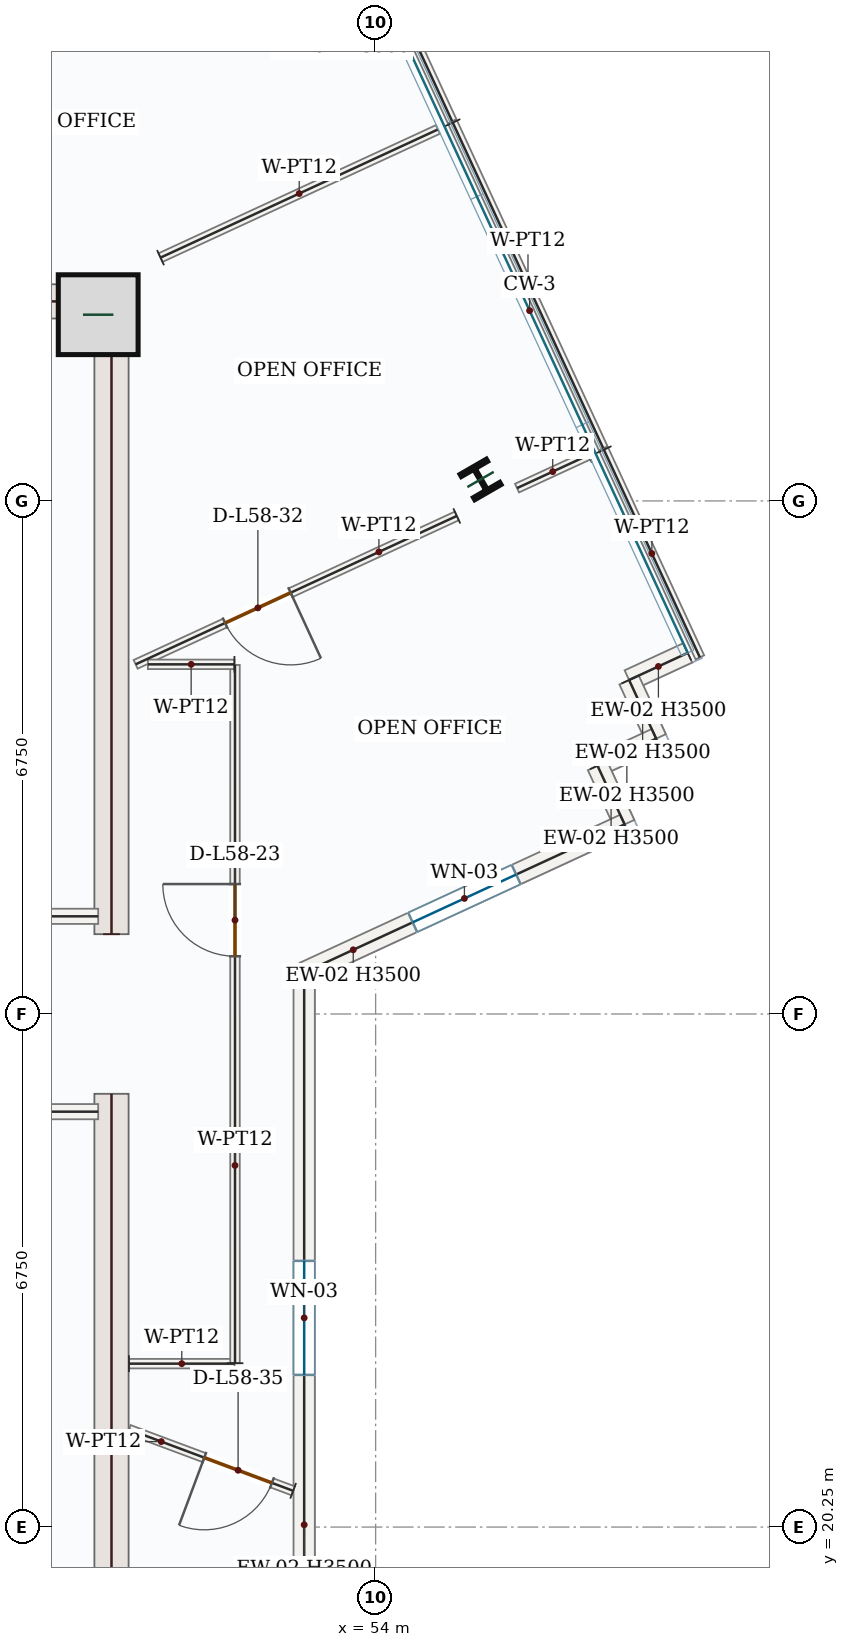
"""IFC4 building model, lengths in metres.
Left out: names, types, materials, properties, quantities, classifications, styles, units other than length and angle.
Written with IfcOpenShell. Run it as: python <this file> out.ifc"""

import sys

from ifc_helpers import new_model, si_unit, direction, frame, frame_2d, origin, origin_2d, place, context, subcontext, project, spatial, rectangle, i_section, extrude, source, transform, mapped, element, fill, save


model = new_model("IFC4")
c1 = context("Model", 3, precision=1e-05, world=origin(), true_north=direction((0.0, 1.0)))
c2 = subcontext(c1, "Body", "Model", "MODEL_VIEW")
j1 = project(units=[si_unit("LENGTHUNIT", "METRE"), si_unit("PLANEANGLEUNIT", "RADIAN")], contexts=[c1])
p1 = place(None, origin())
s1 = spatial("IfcSite", under=j1, at=p1, CompositionType="ELEMENT")
p2 = place(p1, origin())
s2 = spatial("IfcBuilding", under=s1, at=p2, CompositionType="ELEMENT")
p3 = place(p2, frame((0.0, 0.0, 246.6)))
s3 = spatial("IfcBuildingStorey", under=s2, at=p3, CompositionType="ELEMENT", Elevation=246.6)
m1 = source(origin(), c2, "Body", "SweptSolid", [
    extrude(rectangle(XDim=8.55, YDim=0.45, at=frame_2d((4.275, 0.0))), origin(), (0.0, 0.0, 1.0), 3.5),
])
for number, where, z_axis, x_axis in (
    (1, (50.525, 17.4, 0.0), (0.0, 0.0, 1.0), (0.0, 1.0, 0.0)),
    (2, (50.525, 28.05, 0.0), (0.0, 0.0, 1.0), (0.0, 1.0, 0.0)),
):
    element("IfcWall", number, at=place(p3, frame(where, z_axis=z_axis, x_axis=x_axis)), inside=s3, PredefinedType="SHEAR", context=c2, shape_type="MappedRepresentation", body=[
        mapped(m1, transform((0.0, 0.0, 0.0), x_axis=(1.0, 0.0, 0.0), y_axis=(0.0, 1.0, 0.0), z_axis=(0.0, 0.0, 1.0), scale=1.0)),
    ])
m2 = source(origin(), c2, "Body", "SweptSolid", [
    extrude(rectangle(XDim=7.1, YDim=0.45, at=frame_2d((3.55, 0.0))), origin(), (0.0, 0.0, 1.0), 3.5),
])
p4 = place(p3, frame((43.2, 36.375, 0.0), z_axis=(0.0, 0.0, 1.0), x_axis=(1.0, 0.0, 0.0)))
e3 = element("IfcWall", 3, at=p4, inside=s3, PredefinedType="SHEAR", context=c2, shape_type="MappedRepresentation", body=[
    mapped(m2, transform((0.0, 0.0, 0.0), x_axis=(1.0, 0.0, 0.0), y_axis=(0.0, 1.0, 0.0), z_axis=(0.0, 0.0, 1.0), scale=1.0)),
])
m3 = source(origin(), c2, "Body", "SweptSolid", [
    extrude(rectangle(XDim=1.05, YDim=1.05, at=origin_2d()), origin(), (0.0, 0.0, 1.0), 3.75),
])
p5 = place(p3, frame((50.35, 36.2, 0.0), z_axis=(0.0, 0.0, 1.0), x_axis=(1.0, 0.0, 0.0)))
e4 = element("IfcColumn", 4, at=p5, inside=s3, PredefinedType="COLUMN", context=c2, shape_type="MappedRepresentation", body=[
    mapped(m3, transform((0.0, 0.0, 0.0), x_axis=(1.0, 0.0, 0.0), y_axis=(0.0, 1.0, 0.0), z_axis=(0.0, 0.0, 1.0), scale=1.0)),
])
m4 = source(origin(), c2, "Body", "SweptSolid", [
    extrude(i_section(OverallWidth=0.399, OverallDepth=0.386, WebThickness=0.021, FlangeThickness=0.033, FilletRadius=0.018, at=origin_2d()), origin(), (0.0, 0.0, 1.0), 3.75),
])
p6 = place(p3, frame((55.38, 34.032, 0.0), z_axis=(0.0, 0.0, 1.0), x_axis=(0.866025403784, 0.5, 0.0)))
e5 = element("IfcColumn", 5, at=p6, inside=s3, PredefinedType="COLUMN", context=c2, shape_type="MappedRepresentation", body=[
    mapped(m4, transform((0.0, 0.0, 0.0), x_axis=(1.0, 0.0, 0.0), y_axis=(0.0, 1.0, 0.0), z_axis=(0.0, 0.0, 1.0), scale=1.0)),
])
p7 = place(p3, frame((46.655, 39.26, 0.0), z_axis=(0.0, 0.0, 1.0), x_axis=(0.907767275269, 0.419474163627, 0.0)))
e6 = element("IfcWall", 6, at=p7, inside=s3, PredefinedType="SOLIDWALL", context=c2, shape_type="SweptSolid", body=[
    extrude(rectangle(XDim=5.545, YDim=0.28, at=frame_2d((2.772, 0.0))), origin(), (0.0, 0.0, 1.0), 3.5),
])
p8 = place(p7, frame((2.022, 0.0, 0.85)))
e7 = element("IfcOpeningElement", 7, at=p8, cuts=e6, PredefinedType="OPENING", context=c2, shape_type="SweptSolid", body=[
    extrude(rectangle(XDim=1.5, YDim=1.5, at=frame_2d((0.75, 0.75))), frame((0.0, 0.15, 0.0), z_axis=(0.0, -1.0, 0.0), x_axis=(1.0, 0.0, 0.0)), (0.0, 0.0, 1.0), 0.3),
])
m5 = source(origin(), c2, "Body", "SweptSolid", [
    extrude(rectangle(XDim=0.85, YDim=0.28, at=frame_2d((0.425, 0.0))), origin(), (0.0, 0.0, 1.0), 3.5),
])
for number, where, z_axis, x_axis in (
    (8, (58.106, 31.75, 0.0), (0.0, 0.0, 1.0), (-0.908, -0.419, 0.0)),
    (9, (57.334, 31.394, 0.0), (0.0, 0.0, 1.0), (0.419, -0.908, 0.0)),
):
    element("IfcWall", number, at=place(p3, frame(where, z_axis=z_axis, x_axis=x_axis)), inside=s3, PredefinedType="SOLIDWALL", context=c2, shape_type="MappedRepresentation", body=[
        mapped(m5, transform((0.0, 0.0, 0.0), x_axis=(1.0, 0.0, 0.0), y_axis=(0.0, 1.0, 0.0), z_axis=(0.0, 0.0, 1.0), scale=1.0)),
    ])
m6 = source(origin(), c2, "Body", "SweptSolid", [
    extrude(rectangle(XDim=0.85, YDim=0.28, at=frame_2d((0.425, 0.0))), origin(), (0.0, 0.0, 1.0), 3.5),
])
for number, where, z_axis, x_axis in (
    (10, (57.691, 30.622, 0.0), (0.0, 0.0, 1.0), (-0.908, -0.419, 0.0)),
    (11, (56.919, 30.266, 0.0), (0.0, 0.0, 1.0), (0.419, -0.908, 0.0)),
):
    element("IfcWall", number, at=place(p3, frame(where, z_axis=z_axis, x_axis=x_axis)), inside=s3, PredefinedType="SOLIDWALL", context=c2, shape_type="MappedRepresentation", body=[
        mapped(m6, transform((0.0, 0.0, 0.0), x_axis=(1.0, 0.0, 0.0), y_axis=(0.0, 1.0, 0.0), z_axis=(0.0, 0.0, 1.0), scale=1.0)),
    ])
p9 = place(p3, frame((57.276, 29.494, 0.0), z_axis=(0.0, 0.0, 1.0), x_axis=(-0.907756183213, -0.419498166669, 0.0)))
e12 = element("IfcWall", 12, at=p9, inside=s3, PredefinedType="SOLIDWALL", context=c2, shape_type="SweptSolid", body=[
    extrude(rectangle(XDim=4.644, YDim=0.28, at=frame_2d((2.322, 0.0))), origin(), (0.0, 0.0, 1.0), 3.5),
])
p10 = place(p9, frame((1.572, 0.0, 0.85)))
e13 = element("IfcOpeningElement", 13, at=p10, cuts=e12, PredefinedType="OPENING", context=c2, shape_type="SweptSolid", body=[
    extrude(rectangle(XDim=1.5, YDim=1.5, at=frame_2d((0.75, 0.75))), frame((0.0, 0.15, 0.0), z_axis=(0.0, -1.0, 0.0), x_axis=(1.0, 0.0, 0.0)), (0.0, 0.0, 1.0), 0.3),
])
p11 = place(p3, frame((53.06, 27.546, 0.0), z_axis=(0.0, 0.0, 1.0), x_axis=(0.0, -1.0, 0.0)))
e14 = element("IfcWall", 14, at=p11, inside=s3, PredefinedType="SOLIDWALL", context=c2, shape_type="SweptSolid", body=[
    extrude(rectangle(XDim=9.088, YDim=0.28, at=frame_2d((4.544, 0.0))), origin(), (0.0, 0.0, 1.0), 3.5),
])
p12 = place(p11, frame((3.794, 0.0, 0.85)))
e15 = element("IfcOpeningElement", 15, at=p12, cuts=e14, PredefinedType="OPENING", context=c2, shape_type="SweptSolid", body=[
    extrude(rectangle(XDim=1.5, YDim=1.5, at=frame_2d((0.75, 0.75))), frame((0.0, 0.15, 0.0), z_axis=(0.0, -1.0, 0.0), x_axis=(1.0, 0.0, 0.0)), (0.0, 0.0, 1.0), 0.3),
])
m7 = source(origin(), c2, "Body", "SweptSolid", [
    extrude(rectangle(XDim=4.25, YDim=0.2, at=frame_2d((2.125, 0.0))), origin(), (0.0, 0.0, 1.0), 3.5),
])
for number, where, z_axis, x_axis in (
    (16, (46.1, 25.715, 0.0), (0.0, 0.0, 1.0), (1.0, 0.0, 0.0)),
    (17, (46.1, 28.285, 0.0), (0.0, 0.0, 1.0), (1.0, 0.0, 0.0)),
):
    element("IfcWall", number, at=place(p3, frame(where, z_axis=z_axis, x_axis=x_axis)), inside=s3, PredefinedType="SOLIDWALL", context=c2, shape_type="MappedRepresentation", body=[
        mapped(m7, transform((0.0, 0.0, 0.0), x_axis=(1.0, 0.0, 0.0), y_axis=(0.0, 1.0, 0.0), z_axis=(0.0, 0.0, 1.0), scale=1.0)),
    ])
m8 = source(origin(), c2, "Body", "SweptSolid", [
    extrude(rectangle(XDim=4.02, YDim=0.125, at=frame_2d((2.01, 0.0))), origin(), (0.0, 0.0, 1.0), 3.5),
])
p13 = place(p3, frame((51.17, 36.951, 0.0), z_axis=(0.0, 0.0, 1.0), x_axis=(0.907776222313, 0.419454801145, 0.0)))
e18 = element("IfcWall", 18, at=p13, inside=s3, PredefinedType="PARTITIONING", context=c2, shape_type="MappedRepresentation", body=[
    mapped(m8, transform((0.0, 0.0, 0.0), x_axis=(1.0, 0.0, 0.0), y_axis=(0.0, 1.0, 0.0), z_axis=(0.0, 0.0, 1.0), scale=1.0)),
])
m9 = source(origin(), c2, "Body", "SweptSolid", [
    extrude(rectangle(XDim=4.72, YDim=0.125, at=frame_2d((2.36, 0.0))), origin(), (0.0, 0.0, 1.0), 3.5),
])
p14 = place(p3, frame((55.015, 38.727, 0.0), z_axis=(0.0, 0.0, 1.0), x_axis=(0.419422223592, -0.907791274665, 0.0)))
e19 = element("IfcWall", 19, at=p14, inside=s3, PredefinedType="PARTITIONING", context=c2, shape_type="MappedRepresentation", body=[
    mapped(m9, transform((0.0, 0.0, 0.0), x_axis=(1.0, 0.0, 0.0), y_axis=(0.0, 1.0, 0.0), z_axis=(0.0, 0.0, 1.0), scale=1.0)),
])
m10 = source(origin(), c2, "Body", "SweptSolid", [
    extrude(rectangle(XDim=1.034, YDim=0.125, at=frame_2d((0.517, 0.0))), origin(), (0.0, 0.0, 1.0), 3.5),
])
p15 = place(p3, frame((56.799, 34.352, 0.0), z_axis=(0.0, 0.0, 1.0), x_axis=(-0.907786599617, -0.419432342049, 0.0)))
e20 = element("IfcWall", 20, at=p15, inside=s3, PredefinedType="PARTITIONING", context=c2, shape_type="MappedRepresentation", body=[
    mapped(m10, transform((0.0, 0.0, 0.0), x_axis=(1.0, 0.0, 0.0), y_axis=(0.0, 1.0, 0.0), z_axis=(0.0, 0.0, 1.0), scale=1.0)),
])
p16 = place(p3, frame((55.068, 33.552, 0.0), z_axis=(0.0, 0.0, 1.0), x_axis=(-0.90779658515, -0.419410729465, 0.0)))
e21 = element("IfcWall", 21, at=p16, inside=s3, PredefinedType="PARTITIONING", context=c2, shape_type="SweptSolid", body=[
    extrude(rectangle(XDim=4.655, YDim=0.125, at=frame_2d((2.327, 0.0))), origin(), (0.0, 0.0, 1.0), 3.5),
])
p17 = place(p16, frame((2.408, 0.0, 0.0)))
e22 = element("IfcOpeningElement", 22, at=p17, cuts=e21, PredefinedType="OPENING", context=c2, shape_type="SweptSolid", body=[
    extrude(rectangle(XDim=0.95, YDim=2.15, at=frame_2d((0.475, 1.075))), frame((0.0, 0.073, 0.0), z_axis=(0.0, -1.0, 0.0), x_axis=(1.0, 0.0, 0.0)), (0.0, 0.0, 1.0), 0.145),
])
m11 = source(origin(), c2, "Body", "SweptSolid", [
    extrude(rectangle(XDim=1.389, YDim=0.125, at=frame_2d((0.695, 0.0))), origin(), (0.0, 0.0, 1.0), 3.5),
])
p18 = place(p3, frame((50.755, 22.4, 0.0), z_axis=(0.0, 0.0, 1.0), x_axis=(1.0, 0.0, 0.0)))
e23 = element("IfcWall", 23, at=p18, inside=s3, PredefinedType="PARTITIONING", context=c2, shape_type="MappedRepresentation", body=[
    mapped(m11, transform((0.0, 0.0, 0.0), x_axis=(1.0, 0.0, 0.0), y_axis=(0.0, 1.0, 0.0), z_axis=(0.0, 0.0, 1.0), scale=1.0)),
])
p19 = place(p3, frame((52.15, 22.406, 0.0), z_axis=(0.0, 0.0, 1.0), x_axis=(-2.657666e-05, 0.999999999647, 0.0)))
e24 = element("IfcWall", 24, at=p19, inside=s3, PredefinedType="PARTITIONING", context=c2, shape_type="SweptSolid", body=[
    extrude(rectangle(XDim=9.186, YDim=0.125, at=frame_2d((4.593, 0.0))), origin(), (0.0, 0.0, 1.0), 3.5),
])
p20 = place(p19, frame((5.354, 0.0, 0.0)))
e25 = element("IfcOpeningElement", 25, at=p20, cuts=e24, PredefinedType="OPENING", context=c2, shape_type="SweptSolid", body=[
    extrude(rectangle(XDim=0.95, YDim=2.15, at=frame_2d((0.475, 1.075))), frame((0.0, 0.073, 0.0), z_axis=(0.0, -1.0, 0.0), x_axis=(1.0, 0.0, 0.0)), (0.0, 0.0, 1.0), 0.145),
])
m12 = source(origin(), c2, "Body", "SweptSolid", [
    extrude(rectangle(XDim=1.139, YDim=0.125, at=frame_2d((0.569, 0.0))), origin(), (0.0, 0.0, 1.0), 3.5),
])
p21 = place(p3, frame((52.142, 31.6, 0.0), z_axis=(0.0, 0.0, 1.0), x_axis=(-0.999999908058, 0.000428816427, 0.0)))
e26 = element("IfcWall", 26, at=p21, inside=s3, PredefinedType="PARTITIONING", context=c2, shape_type="MappedRepresentation", body=[
    mapped(m12, transform((0.0, 0.0, 0.0), x_axis=(1.0, 0.0, 0.0), y_axis=(0.0, 1.0, 0.0), z_axis=(0.0, 0.0, 1.0), scale=1.0)),
])
m13 = source(origin(), c2, "Body", "SweptSolid", [
    extrude(rectangle(XDim=3.01, YDim=0.125, at=frame_2d((1.505, 0.0))), origin(), (0.0, 0.0, 1.0), 3.5),
])
p22 = place(p3, frame((57.003, 34.424, 0.0), z_axis=(0.0, 0.0, 1.0), x_axis=(0.419490178077, -0.90775987491, 0.0)))
e27 = element("IfcWall", 27, at=p22, inside=s3, PredefinedType="PARTITIONING", context=c2, shape_type="MappedRepresentation", body=[
    mapped(m13, transform((0.0, 0.0, 0.0), x_axis=(1.0, 0.0, 0.0), y_axis=(0.0, 1.0, 0.0), z_axis=(0.0, 0.0, 1.0), scale=1.0)),
])
p23 = place(p3, frame((52.915, 20.727, 0.0), z_axis=(0.0, 0.0, 1.0), x_axis=(-0.936884992217, 0.349637685839, 0.0)))
e28 = element("IfcWall", 28, at=p23, inside=s3, PredefinedType="PARTITIONING", context=c2, shape_type="SweptSolid", body=[
    extrude(rectangle(XDim=2.306, YDim=0.125, at=frame_2d((1.153, 0.0))), origin(), (0.0, 0.0, 1.0), 3.5),
])
p24 = place(p23, frame((0.298, 0.0, 0.0)))
e29 = element("IfcOpeningElement", 29, at=p24, cuts=e28, PredefinedType="OPENING", context=c2, shape_type="SweptSolid", body=[
    extrude(rectangle(XDim=0.95, YDim=2.15, at=frame_2d((0.475, 1.075))), frame((0.0, 0.073, 0.0), z_axis=(0.0, -1.0, 0.0), x_axis=(1.0, 0.0, 0.0)), (0.0, 0.0, 1.0), 0.145),
])
m14 = source(origin(), c2, "Body", "SweptSolid", [
    extrude(rectangle(XDim=2.39, YDim=0.125, at=frame_2d((1.195, 0.0))), origin(), (0.0, 0.0, 1.0), 3.5),
])
p25 = place(p3, frame((54.004, 40.915, 0.0), z_axis=(0.0, 0.0, 1.0), x_axis=(0.419459790898, -0.907773916688, 0.0)))
e30 = element("IfcWall", 30, at=p25, inside=s3, PredefinedType="PARTITIONING", context=c2, shape_type="MappedRepresentation", body=[
    mapped(m14, transform((0.0, 0.0, 0.0), x_axis=(1.0, 0.0, 0.0), y_axis=(0.0, 1.0, 0.0), z_axis=(0.0, 0.0, 1.0), scale=1.0)),
])
m15 = source(origin(), c2, "Body", "SweptSolid", [
    extrude(rectangle(XDim=1.5, YDim=1.5, at=frame_2d((0.75, 0.75))), frame((0.0, 0.03, 0.0), z_axis=(0.0, -1.0, 0.0), x_axis=(1.0, 0.0, 0.0)), (0.0, 0.0, 1.0), 0.06),
])
p26 = place(p10, origin())
e31 = element("IfcWindow", 31, at=p26, inside=s3, PartitioningType="SINGLE_PANEL", PredefinedType="WINDOW", context=c2, shape_type="MappedRepresentation", body=[
    mapped(m15, transform((0.0, 0.0, 0.0), x_axis=(1.0, 0.0, 0.0), y_axis=(0.0, 1.0, 0.0), z_axis=(0.0, 0.0, 1.0), scale=1.0)),
])
fill(e13, e31)
p27 = place(p12, origin())
e32 = element("IfcWindow", 32, at=p27, inside=s3, PartitioningType="SINGLE_PANEL", PredefinedType="WINDOW", context=c2, shape_type="MappedRepresentation", body=[
    mapped(m15, transform((0.0, 0.0, 0.0), x_axis=(1.0, 0.0, 0.0), y_axis=(0.0, 1.0, 0.0), z_axis=(0.0, 0.0, 1.0), scale=1.0)),
])
fill(e15, e32)
m16 = source(origin(), c2, "Body", "SweptSolid", [
    extrude(rectangle(XDim=0.95, YDim=2.15, at=frame_2d((0.475, 1.075))), frame((0.0, 0.025, 0.0), z_axis=(0.0, -1.0, 0.0), x_axis=(1.0, 0.0, 0.0)), (0.0, 0.0, 1.0), 0.05),
])
p28 = place(p20, origin())
e33 = element("IfcDoor", 33, at=p28, inside=s3, OperationType="SINGLE_SWING_RIGHT", PredefinedType="DOOR", context=c2, shape_type="MappedRepresentation", body=[
    mapped(m16, transform((0.0, 0.0, 0.0), x_axis=(1.0, 0.0, 0.0), y_axis=(0.0, 1.0, 0.0), z_axis=(0.0, 0.0, 1.0), scale=1.0)),
])
fill(e25, e33)
p29 = place(p17, origin())
e34 = element("IfcDoor", 34, at=p29, inside=s3, OperationType="SINGLE_SWING_LEFT", PredefinedType="DOOR", context=c2, shape_type="MappedRepresentation", body=[
    mapped(m16, transform((0.0, 0.0, 0.0), x_axis=(1.0, 0.0, 0.0), y_axis=(0.0, 1.0, 0.0), z_axis=(0.0, 0.0, 1.0), scale=1.0)),
])
fill(e22, e34)
p30 = place(p24, origin())
e35 = element("IfcDoor", 35, at=p30, inside=s3, OperationType="SINGLE_SWING_RIGHT", PredefinedType="DOOR", context=c2, shape_type="MappedRepresentation", body=[
    mapped(m16, transform((0.0, 0.0, 0.0), x_axis=(1.0, 0.0, 0.0), y_axis=(0.0, 1.0, 0.0), z_axis=(0.0, 0.0, 1.0), scale=1.0)),
])
fill(e29, e35)
save(model, sys.argv[1])
